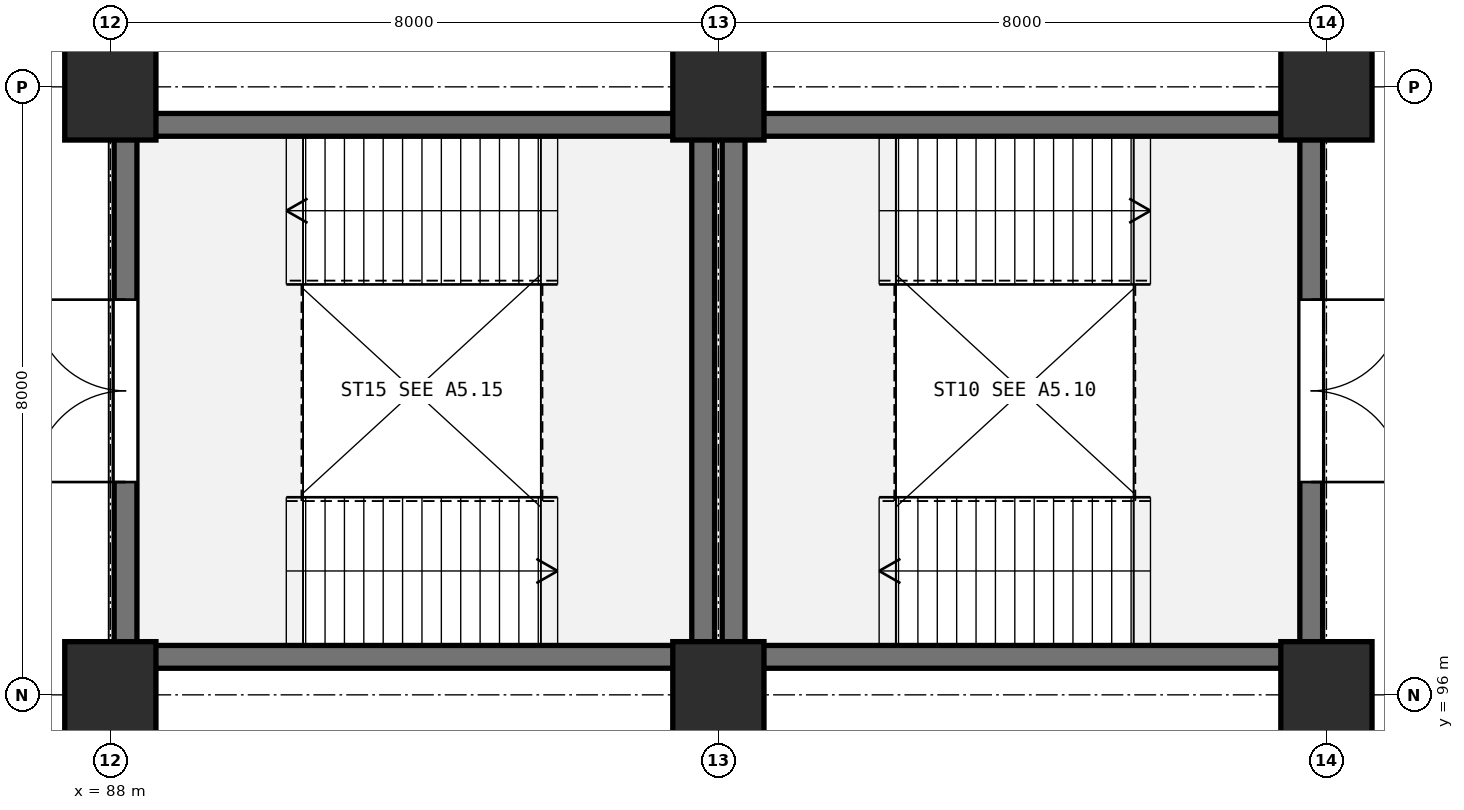
"""IFC4 building model, lengths in metres.
Left out: names, types, materials, properties, quantities, classifications, styles, units other than length and angle.
Written with IfcOpenShell. Run it as: python <this file> out.ifc"""

import sys

from ifc_helpers import new_model, si_unit, direction, frame, frame_2d, origin, origin_2d, place, context, subcontext, project, spatial, rectangle, extrude, element, fill, save


model = new_model("IFC4")
c1 = context("Model", 3, precision=1e-05, world=origin(), true_north=direction((0.0, 1.0)))
c2 = subcontext(c1, "Body", "Model", "MODEL_VIEW")
j1 = project(units=[si_unit("LENGTHUNIT", "METRE"), si_unit("PLANEANGLEUNIT", "RADIAN")], contexts=[c1])
p1 = place(None, origin())
s1 = spatial("IfcSite", under=j1, at=p1, CompositionType="ELEMENT")
p2 = place(p1, origin())
s2 = spatial("IfcBuilding", under=s1, at=p2, CompositionType="ELEMENT")
p3 = place(p2, origin())
s3 = spatial("IfcBuildingStorey", under=s2, at=p3, CompositionType="ELEMENT", Elevation=0.0)
for number, where, z_axis, x_axis in (
    (1, (88.0, 96.0, 0.0), (0.0, 0.0, 1.0), (1.0, 0.0, 0.0)),
    (2, (88.0, 104.0, 0.0), (0.0, 0.0, 1.0), (1.0, 0.0, 0.0)),
    (3, (96.0, 96.0, 0.0), (0.0, 0.0, 1.0), (1.0, 0.0, 0.0)),
    (4, (96.0, 104.0, 0.0), (0.0, 0.0, 1.0), (1.0, 0.0, 0.0)),
    (5, (104.0, 96.0, 0.0), (0.0, 0.0, 1.0), (1.0, 0.0, 0.0)),
    (6, (104.0, 104.0, 0.0), (0.0, 0.0, 1.0), (1.0, 0.0, 0.0)),
):
    element("IfcColumn", number, at=place(p3, frame(where, z_axis=z_axis, x_axis=x_axis)), inside=s3, PredefinedType="COLUMN", context=c2, shape_type="SweptSolid", body=[
        extrude(rectangle(XDim=1.2, YDim=1.4, at=origin_2d()), origin(), (0.0, 0.0, 1.0), 5.4),
    ])
p4 = place(p3, frame((103.8, 96.5, 0.0), z_axis=(0.0, 0.0, 1.0), x_axis=(-1.0, 0.0, 0.0)))
e7 = element("IfcWall", 7, at=p4, inside=s3, PredefinedType="SHEAR", context=c2, shape_type="SweptSolid", body=[
    extrude(rectangle(XDim=7.6, YDim=0.3, at=frame_2d((3.8, 0.0))), origin(), (0.0, 0.0, 1.0), 5.08),
])
p5 = place(p3, frame((96.2, 96.5, 0.0), z_axis=(0.0, 0.0, 1.0), x_axis=(0.0, 1.0, 0.0)))
e8 = element("IfcWall", 8, at=p5, inside=s3, PredefinedType="SHEAR", context=c2, shape_type="SweptSolid", body=[
    extrude(rectangle(XDim=7.0, YDim=0.3, at=frame_2d((3.5, 0.0))), origin(), (0.0, 0.0, 1.0), 5.08),
])
p6 = place(p3, frame((96.2, 103.5, 0.0), z_axis=(0.0, 0.0, 1.0), x_axis=(1.0, 0.0, 0.0)))
e9 = element("IfcWall", 9, at=p6, inside=s3, PredefinedType="SHEAR", context=c2, shape_type="SweptSolid", body=[
    extrude(rectangle(XDim=7.6, YDim=0.3, at=frame_2d((3.8, 0.0))), origin(), (0.0, 0.0, 1.0), 5.08),
])
p7 = place(p3, frame((103.8, 103.5, 0.0), z_axis=(0.0, 0.0, 1.0), x_axis=(0.0, -1.0, 0.0)))
e10 = element("IfcWall", 10, at=p7, inside=s3, PredefinedType="SHEAR", context=c2, shape_type="SweptSolid", body=[
    extrude(rectangle(XDim=7.0, YDim=0.3, at=frame_2d((3.5, 0.0))), origin(), (0.0, 0.0, 1.0), 5.08),
])
p8 = place(p7, frame((2.3, 0.0, 0.0)))
e11 = element("IfcOpeningElement", 11, at=p8, cuts=e10, PredefinedType="OPENING", context=c2, shape_type="SweptSolid", body=[
    extrude(rectangle(XDim=2.4, YDim=2.2, at=frame_2d((1.2, 1.1))), frame((0.0, 0.16, 0.0), z_axis=(0.0, -1.0, 0.0), x_axis=(1.0, 0.0, 0.0)), (0.0, 0.0, 1.0), 0.32),
])
p9 = place(p3, frame((95.8, 96.5, 0.0), z_axis=(0.0, 0.0, 1.0), x_axis=(-1.0, 0.0, 0.0)))
e12 = element("IfcWall", 12, at=p9, inside=s3, PredefinedType="SHEAR", context=c2, shape_type="SweptSolid", body=[
    extrude(rectangle(XDim=7.6, YDim=0.3, at=frame_2d((3.8, 0.0))), origin(), (0.0, 0.0, 1.0), 5.08),
])
p10 = place(p3, frame((88.2, 96.5, 0.0), z_axis=(0.0, 0.0, 1.0), x_axis=(0.0, 1.0, 0.0)))
e13 = element("IfcWall", 13, at=p10, inside=s3, PredefinedType="SHEAR", context=c2, shape_type="SweptSolid", body=[
    extrude(rectangle(XDim=7.0, YDim=0.3, at=frame_2d((3.5, 0.0))), origin(), (0.0, 0.0, 1.0), 5.08),
])
p11 = place(p10, frame((2.3, 0.0, 0.0)))
e14 = element("IfcOpeningElement", 14, at=p11, cuts=e13, PredefinedType="OPENING", context=c2, shape_type="SweptSolid", body=[
    extrude(rectangle(XDim=2.4, YDim=2.2, at=frame_2d((1.2, 1.1))), frame((0.0, 0.16, 0.0), z_axis=(0.0, -1.0, 0.0), x_axis=(1.0, 0.0, 0.0)), (0.0, 0.0, 1.0), 0.32),
])
p12 = place(p3, frame((88.2, 103.5, 0.0), z_axis=(0.0, 0.0, 1.0), x_axis=(1.0, 0.0, 0.0)))
e15 = element("IfcWall", 15, at=p12, inside=s3, PredefinedType="SHEAR", context=c2, shape_type="SweptSolid", body=[
    extrude(rectangle(XDim=7.6, YDim=0.3, at=frame_2d((3.8, 0.0))), origin(), (0.0, 0.0, 1.0), 5.08),
])
p13 = place(p3, frame((95.8, 103.5, 0.0), z_axis=(0.0, 0.0, 1.0), x_axis=(0.0, -1.0, 0.0)))
e16 = element("IfcWall", 16, at=p13, inside=s3, PredefinedType="SHEAR", context=c2, shape_type="SweptSolid", body=[
    extrude(rectangle(XDim=7.0, YDim=0.3, at=frame_2d((3.5, 0.0))), origin(), (0.0, 0.0, 1.0), 5.08),
])
p14 = place(p8, origin())
e17 = element("IfcDoor", 17, at=p14, inside=s3, OperationType="DOUBLE_DOOR_SINGLE_SWING", PredefinedType="DOOR", context=c2, shape_type="SweptSolid", body=[
    extrude(rectangle(XDim=2.4, YDim=2.2, at=frame_2d((1.2, 1.1))), frame((0.0, 0.025, 0.0), z_axis=(0.0, -1.0, 0.0), x_axis=(1.0, 0.0, 0.0)), (0.0, 0.0, 1.0), 0.05),
])
fill(e11, e17)
p15 = place(p11, origin())
e18 = element("IfcDoor", 18, at=p15, inside=s3, OperationType="DOUBLE_DOOR_SINGLE_SWING", PredefinedType="DOOR", context=c2, shape_type="SweptSolid", body=[
    extrude(rectangle(XDim=2.4, YDim=2.2, at=frame_2d((1.2, 1.1))), frame((0.0, 0.025, 0.0), z_axis=(0.0, -1.0, 0.0), x_axis=(1.0, 0.0, 0.0)), (0.0, 0.0, 1.0), 0.05),
])
fill(e14, e18)
save(model, sys.argv[1])
